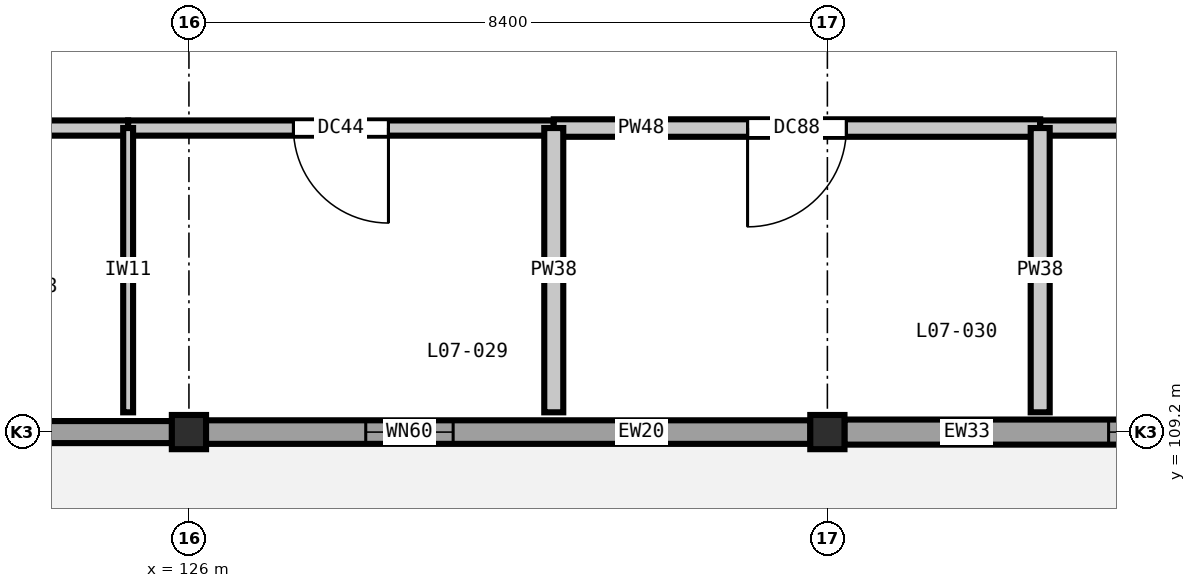
"""IFC4 building model, lengths in metres.
Left out: names, types, materials, properties, quantities, classifications, styles, units other than length and angle.
Written with IfcOpenShell. Run it as: python <this file> out.ifc"""

import sys

from ifc_helpers import new_model, si_unit, direction, frame, frame_2d, origin, origin_2d, place, context, subcontext, project, spatial, rectangle, extrude, element, fill, save


model = new_model("IFC4")
c1 = context("Model", 3, precision=1e-05, world=origin(), true_north=direction((0.0, 1.0)))
c2 = subcontext(c1, "Body", "Model", "MODEL_VIEW")
j1 = project(units=[si_unit("LENGTHUNIT", "METRE"), si_unit("PLANEANGLEUNIT", "RADIAN")], contexts=[c1])
p1 = place(None, origin())
s1 = spatial("IfcSite", under=j1, at=p1, CompositionType="ELEMENT")
p2 = place(p1, origin())
s2 = spatial("IfcBuilding", under=s1, at=p2, CompositionType="ELEMENT")
p3 = place(p2, frame((0.0, 0.0, 33.0)))
s3 = spatial("IfcBuildingStorey", under=s2, at=p3, CompositionType="ELEMENT", Elevation=33.0)
for number, where, z_axis, x_axis in (
    (1, (126.0, 109.2, 0.0), (0.0, 0.0, 1.0), (1.0, 0.0, 0.0)),
    (2, (134.4, 109.2, 0.0), (0.0, 0.0, 1.0), (1.0, 0.0, 0.0)),
):
    element("IfcColumn", number, at=place(p3, frame(where, z_axis=z_axis, x_axis=x_axis)), inside=s3, PredefinedType="COLUMN", context=c2, shape_type="SweptSolid", body=[
        extrude(rectangle(XDim=0.45, YDim=0.45, at=origin_2d()), origin(), (0.0, 0.0, 1.0), 4.2),
    ])
p4 = place(p3, frame((142.577, 109.2, 0.0), z_axis=(0.0, 0.0, 1.0), x_axis=(-1.0, 0.0, 0.0)))
e3 = element("IfcWall", 3, at=p4, inside=s3, PredefinedType="SOLIDWALL", context=c2, shape_type="SweptSolid", body=[
    extrude(rectangle(XDim=7.954, YDim=0.33, at=frame_2d((3.977, 0.0))), origin(), (0.0, 0.0, 1.0), 3.48),
])
p5 = place(p4, frame((3.477, 0.0, 0.9)))
e4 = element("IfcOpeningElement", 4, at=p5, cuts=e3, PredefinedType="OPENING", context=c2, shape_type="SweptSolid", body=[
    extrude(rectangle(XDim=1.0, YDim=1.75, at=frame_2d((0.5, 0.875))), frame((0.0, 0.175, 0.0), z_axis=(0.0, -1.0, 0.0), x_axis=(1.0, 0.0, 0.0)), (0.0, 0.0, 1.0), 0.35),
])
p6 = place(p3, frame((134.177, 109.2, 0.0), z_axis=(0.0, 0.0, 1.0), x_axis=(-1.0, 0.0, 0.0)))
e5 = element("IfcWall", 5, at=p6, inside=s3, PredefinedType="SOLIDWALL", context=c2, shape_type="SweptSolid", body=[
    extrude(rectangle(XDim=7.954, YDim=0.31, at=frame_2d((3.977, 0.0))), origin(), (0.0, 0.0, 1.0), 3.48),
])
p7 = place(p6, frame((4.701, 0.0, 0.9)))
e6 = element("IfcOpeningElement", 6, at=p7, cuts=e5, PredefinedType="OPENING", context=c2, shape_type="SweptSolid", body=[
    extrude(rectangle(XDim=1.15, YDim=1.75, at=frame_2d((0.575, 0.875))), frame((0.0, 0.165, 0.0), z_axis=(0.0, -1.0, 0.0), x_axis=(1.0, 0.0, 0.0)), (0.0, 0.0, 1.0), 0.33),
])
p8 = place(p3, frame((125.777, 109.2, 0.0), z_axis=(0.0, 0.0, 1.0), x_axis=(-1.0, 0.0, 0.0)))
e7 = element("IfcWall", 7, at=p8, inside=s3, PredefinedType="SOLIDWALL", context=c2, shape_type="SweptSolid", body=[
    extrude(rectangle(XDim=7.954, YDim=0.29, at=frame_2d((3.977, 0.0))), origin(), (0.0, 0.0, 1.0), 3.48),
])
p9 = place(p8, frame((3.327, 0.0, 0.9)))
e8 = element("IfcOpeningElement", 8, at=p9, cuts=e7, PredefinedType="OPENING", context=c2, shape_type="SweptSolid", body=[
    extrude(rectangle(XDim=1.3, YDim=1.75, at=frame_2d((0.65, 0.875))), frame((0.0, 0.155, 0.0), z_axis=(0.0, -1.0, 0.0), x_axis=(1.0, 0.0, 0.0)), (0.0, 0.0, 1.0), 0.31),
])
p10 = place(p3, frame((116.4, 113.2, 0.0), z_axis=(0.0, 0.0, 1.0), x_axis=(1.0, 0.0, 0.0)))
e9 = element("IfcWall", 9, at=p10, inside=s3, PredefinedType="PARTITIONING", context=c2, shape_type="SweptSolid", body=[
    extrude(rectangle(XDim=8.8, YDim=0.2, at=frame_2d((4.4, 0.0))), origin(), (0.0, 0.0, 1.0), 3.92),
])
p11 = place(p10, frame((3.475, 0.0, 0.0)))
e10 = element("IfcOpeningElement", 10, at=p11, cuts=e9, PredefinedType="OPENING", context=c2, shape_type="SweptSolid", body=[
    extrude(rectangle(XDim=1.85, YDim=2.3, at=frame_2d((0.925, 1.15))), frame((0.0, 0.11, 0.0), z_axis=(0.0, -1.0, 0.0), x_axis=(1.0, 0.0, 0.0)), (0.0, 0.0, 1.0), 0.22),
])
p12 = place(p3, frame((125.2, 113.2, 0.0), z_axis=(0.0, 0.0, 1.0), x_axis=(1.0, 0.0, 0.0)))
e11 = element("IfcWall", 11, at=p12, inside=s3, PredefinedType="PARTITIONING", context=c2, shape_type="SweptSolid", body=[
    extrude(rectangle(XDim=5.6, YDim=0.2, at=frame_2d((2.8, 0.0))), origin(), (0.0, 0.0, 1.0), 3.92),
])
p13 = place(p12, frame((2.175, 0.0, 0.0)))
e12 = element("IfcOpeningElement", 12, at=p13, cuts=e11, PredefinedType="OPENING", context=c2, shape_type="SweptSolid", body=[
    extrude(rectangle(XDim=1.25, YDim=2.15, at=frame_2d((0.625, 1.075))), frame((0.0, 0.11, 0.0), z_axis=(0.0, -1.0, 0.0), x_axis=(1.0, 0.0, 0.0)), (0.0, 0.0, 1.0), 0.22),
])
p14 = place(p3, frame((130.8, 113.2, 0.0), z_axis=(0.0, 0.0, 1.0), x_axis=(1.0, 0.0, 0.0)))
e13 = element("IfcWall", 13, at=p14, inside=s3, PredefinedType="PARTITIONING", context=c2, shape_type="SweptSolid", body=[
    extrude(rectangle(XDim=6.4, YDim=0.23, at=frame_2d((3.2, 0.0))), origin(), (0.0, 0.0, 1.0), 3.92),
])
p15 = place(p14, frame((2.55, 0.0, 0.0)))
e14 = element("IfcOpeningElement", 14, at=p15, cuts=e13, PredefinedType="OPENING", context=c2, shape_type="SweptSolid", body=[
    extrude(rectangle(XDim=1.3, YDim=2.2, at=frame_2d((0.65, 1.1))), frame((0.0, 0.125, 0.0), z_axis=(0.0, -1.0, 0.0), x_axis=(1.0, 0.0, 0.0)), (0.0, 0.0, 1.0), 0.25),
])
p16 = place(p3, frame((137.2, 113.2, 0.0), z_axis=(0.0, 0.0, 1.0), x_axis=(1.0, 0.0, 0.0)))
e15 = element("IfcWall", 15, at=p16, inside=s3, PredefinedType="PARTITIONING", context=c2, shape_type="SweptSolid", body=[
    extrude(rectangle(XDim=7.2, YDim=0.2, at=frame_2d((3.6, 0.0))), origin(), (0.0, 0.0, 1.0), 3.92),
])
p17 = place(p16, frame((2.925, 0.0, 0.0)))
e16 = element("IfcOpeningElement", 16, at=p17, cuts=e15, PredefinedType="OPENING", context=c2, shape_type="SweptSolid", body=[
    extrude(rectangle(XDim=1.35, YDim=2.2, at=frame_2d((0.675, 1.1))), frame((0.0, 0.11, 0.0), z_axis=(0.0, -1.0, 0.0), x_axis=(1.0, 0.0, 0.0)), (0.0, 0.0, 1.0), 0.22),
])
p18 = place(p3, frame((125.2, 109.46, 0.0), z_axis=(0.0, 0.0, 1.0), x_axis=(0.0, 1.0, 0.0)))
e17 = element("IfcWall", 17, at=p18, inside=s3, PredefinedType="PARTITIONING", context=c2, shape_type="SweptSolid", body=[
    extrude(rectangle(XDim=3.74, YDim=0.13, at=frame_2d((1.87, 0.0))), origin(), (0.0, 0.0, 1.0), 3.92),
])
for number, where, z_axis, x_axis in (
    (18, (130.8, 109.46, 0.0), (0.0, 0.0, 1.0), (0.0, 1.0, 0.0)),
    (19, (137.2, 109.46, 0.0), (0.0, 0.0, 1.0), (0.0, 1.0, 0.0)),
):
    element("IfcWall", number, at=place(p3, frame(where, z_axis=z_axis, x_axis=x_axis)), inside=s3, PredefinedType="PARTITIONING", context=c2, shape_type="SweptSolid", body=[
        extrude(rectangle(XDim=3.74, YDim=0.25, at=frame_2d((1.87, 0.0))), origin(), (0.0, 0.0, 1.0), 3.92),
    ])
p19 = place(p5, origin())
e20 = element("IfcWindow", 20, at=p19, inside=s3, PartitioningType="SINGLE_PANEL", PredefinedType="WINDOW", context=c2, shape_type="SweptSolid", body=[
    extrude(rectangle(XDim=1.0, YDim=1.75, at=frame_2d((0.5, 0.875))), frame((0.0, 0.03, 0.0), z_axis=(0.0, -1.0, 0.0), x_axis=(1.0, 0.0, 0.0)), (0.0, 0.0, 1.0), 0.06),
])
fill(e4, e20)
p20 = place(p7, origin())
e21 = element("IfcWindow", 21, at=p20, inside=s3, PartitioningType="SINGLE_PANEL", PredefinedType="WINDOW", context=c2, shape_type="SweptSolid", body=[
    extrude(rectangle(XDim=1.15, YDim=1.75, at=frame_2d((0.575, 0.875))), frame((0.0, 0.03, 0.0), z_axis=(0.0, -1.0, 0.0), x_axis=(1.0, 0.0, 0.0)), (0.0, 0.0, 1.0), 0.06),
])
fill(e6, e21)
p21 = place(p13, frame((1.25, 0.0, 0.0), z_axis=(0.0, 0.0, 1.0), x_axis=(-1.0, 0.0, 0.0)))
e22 = element("IfcDoor", 22, at=p21, inside=s3, OperationType="SINGLE_SWING_LEFT", PredefinedType="DOOR", context=c2, shape_type="SweptSolid", body=[
    extrude(rectangle(XDim=1.25, YDim=2.15, at=frame_2d((0.625, 1.075))), frame((0.0, 0.025, 0.0), z_axis=(0.0, -1.0, 0.0), x_axis=(1.0, 0.0, 0.0)), (0.0, 0.0, 1.0), 0.05),
])
fill(e12, e22)
p22 = place(p15, frame((1.3, 0.0, 0.0), z_axis=(0.0, 0.0, 1.0), x_axis=(-1.0, 0.0, 0.0)))
e23 = element("IfcDoor", 23, at=p22, inside=s3, OperationType="SINGLE_SWING_RIGHT", PredefinedType="DOOR", context=c2, shape_type="SweptSolid", body=[
    extrude(rectangle(XDim=1.3, YDim=2.2, at=frame_2d((0.65, 1.1))), frame((0.0, 0.025, 0.0), z_axis=(0.0, -1.0, 0.0), x_axis=(1.0, 0.0, 0.0)), (0.0, 0.0, 1.0), 0.05),
])
fill(e14, e23)
save(model, sys.argv[1])
